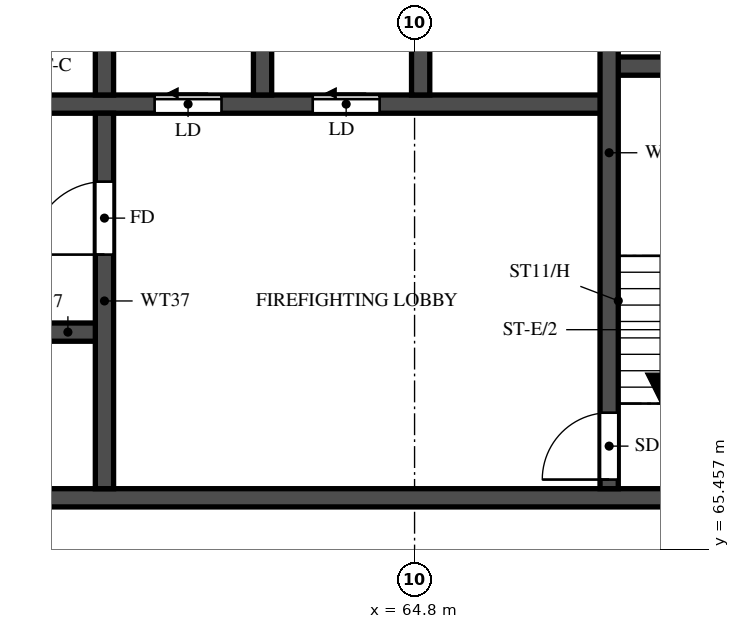
"""IFC4 building model, lengths in metres.
Left out: names, types, materials, properties, quantities, classifications, styles, units other than length and angle.
Written with IfcOpenShell. Run it as: python <this file> out.ifc"""

import sys

from ifc_helpers import new_model, si_unit, direction, frame, frame_2d, origin, place, context, subcontext, project, spatial, rectangle, extrude, element, fill, save


model = new_model("IFC4")
c1 = context("Model", 3, precision=1e-05, world=origin(), true_north=direction((0.0, 1.0)))
c2 = subcontext(c1, "Body", "Model", "MODEL_VIEW")
j1 = project(units=[si_unit("LENGTHUNIT", "METRE"), si_unit("PLANEANGLEUNIT", "RADIAN")], contexts=[c1])
p1 = place(None, origin())
s1 = spatial("IfcSite", under=j1, at=p1, CompositionType="ELEMENT")
p2 = place(p1, origin())
s2 = spatial("IfcBuilding", under=s1, at=p2, CompositionType="ELEMENT")
p3 = place(p2, frame((0.0, 0.0, 246.5)))
s3 = spatial("IfcBuildingStorey", under=s2, at=p3, CompositionType="ELEMENT", Elevation=246.5)
p4 = place(p3, frame((29.2, 66.3, 0.0), z_axis=(0.0, 0.0, 1.0), x_axis=(1.0, 0.0, 0.0)))
e1 = element("IfcWall", 1, at=p4, inside=s3, PredefinedType="SHEAR", context=c2, shape_type="SweptSolid", body=[
    extrude(rectangle(XDim=42.4, YDim=0.3, at=frame_2d((21.2, 0.0))), origin(), (0.0, 0.0, 1.0), 3.22),
])
p5 = place(p4, frame((1.425, 0.0, 0.0)))
e2 = element("IfcOpeningElement", 2, at=p5, cuts=e1, PredefinedType="OPENING", context=c2, shape_type="SweptSolid", body=[
    extrude(rectangle(XDim=1.1, YDim=2.1, at=frame_2d((0.55, 1.05))), frame((0.0, 0.16, 0.0), z_axis=(0.0, -1.0, 0.0), x_axis=(1.0, 0.0, 0.0)), (0.0, 0.0, 1.0), 0.32),
])
p6 = place(p4, frame((4.2, 0.0, 0.0)))
e3 = element("IfcOpeningElement", 3, at=p6, cuts=e1, PredefinedType="OPENING", context=c2, shape_type="SweptSolid", body=[
    extrude(rectangle(XDim=1.8, YDim=2.1, at=frame_2d((0.9, 1.05))), frame((0.0, 0.16, 0.0), z_axis=(0.0, -1.0, 0.0), x_axis=(1.0, 0.0, 0.0)), (0.0, 0.0, 1.0), 0.32),
])
p7 = place(p3, frame((35.65, 69.025, 0.0), z_axis=(0.0, 0.0, 1.0), x_axis=(1.0, 0.0, 0.0)))
e4 = element("IfcWall", 4, at=p7, inside=s3, PredefinedType="SHEAR", context=c2, shape_type="SweptSolid", body=[
    extrude(rectangle(XDim=24.05, YDim=0.3, at=frame_2d((12.025, 0.0))), origin(), (0.0, 0.0, 1.0), 3.22),
])
p8 = place(p7, frame((0.975, 0.0, 0.0)))
e5 = element("IfcOpeningElement", 5, at=p8, cuts=e4, PredefinedType="OPENING", context=c2, shape_type="SweptSolid", body=[
    extrude(rectangle(XDim=1.1, YDim=2.1, at=frame_2d((0.55, 1.05))), frame((0.0, 0.16, 0.0), z_axis=(0.0, -1.0, 0.0), x_axis=(1.0, 0.0, 0.0)), (0.0, 0.0, 1.0), 0.32),
])
p9 = place(p7, frame((3.725, 0.0, 0.0)))
e6 = element("IfcOpeningElement", 6, at=p9, cuts=e4, PredefinedType="OPENING", context=c2, shape_type="SweptSolid", body=[
    extrude(rectangle(XDim=1.1, YDim=2.1, at=frame_2d((0.55, 1.05))), frame((0.0, 0.16, 0.0), z_axis=(0.0, -1.0, 0.0), x_axis=(1.0, 0.0, 0.0)), (0.0, 0.0, 1.0), 0.32),
])
p10 = place(p7, frame((6.475, 0.0, 0.0)))
e7 = element("IfcOpeningElement", 7, at=p10, cuts=e4, PredefinedType="OPENING", context=c2, shape_type="SweptSolid", body=[
    extrude(rectangle(XDim=1.1, YDim=2.1, at=frame_2d((0.55, 1.05))), frame((0.0, 0.16, 0.0), z_axis=(0.0, -1.0, 0.0), x_axis=(1.0, 0.0, 0.0)), (0.0, 0.0, 1.0), 0.32),
])
p11 = place(p7, frame((9.225, 0.0, 0.0)))
e8 = element("IfcOpeningElement", 8, at=p11, cuts=e4, PredefinedType="OPENING", context=c2, shape_type="SweptSolid", body=[
    extrude(rectangle(XDim=1.1, YDim=2.1, at=frame_2d((0.55, 1.05))), frame((0.0, 0.16, 0.0), z_axis=(0.0, -1.0, 0.0), x_axis=(1.0, 0.0, 0.0)), (0.0, 0.0, 1.0), 0.32),
])
p12 = place(p7, frame((11.975, 0.0, 0.0)))
e9 = element("IfcOpeningElement", 9, at=p12, cuts=e4, PredefinedType="OPENING", context=c2, shape_type="SweptSolid", body=[
    extrude(rectangle(XDim=1.1, YDim=2.1, at=frame_2d((0.55, 1.05))), frame((0.0, 0.16, 0.0), z_axis=(0.0, -1.0, 0.0), x_axis=(1.0, 0.0, 0.0)), (0.0, 0.0, 1.0), 0.32),
])
p13 = place(p7, frame((14.725, 0.0, 0.0)))
e10 = element("IfcOpeningElement", 10, at=p13, cuts=e4, PredefinedType="OPENING", context=c2, shape_type="SweptSolid", body=[
    extrude(rectangle(XDim=1.1, YDim=2.1, at=frame_2d((0.55, 1.05))), frame((0.0, 0.16, 0.0), z_axis=(0.0, -1.0, 0.0), x_axis=(1.0, 0.0, 0.0)), (0.0, 0.0, 1.0), 0.32),
])
p14 = place(p7, frame((17.6, 0.0, 0.0)))
e11 = element("IfcOpeningElement", 11, at=p14, cuts=e4, PredefinedType="OPENING", context=c2, shape_type="SweptSolid", body=[
    extrude(rectangle(XDim=1.1, YDim=2.1, at=frame_2d((0.55, 1.05))), frame((0.0, 0.16, 0.0), z_axis=(0.0, -1.0, 0.0), x_axis=(1.0, 0.0, 0.0)), (0.0, 0.0, 1.0), 0.32),
])
p15 = place(p7, frame((20.6, 0.0, 0.0)))
e12 = element("IfcOpeningElement", 12, at=p15, cuts=e4, PredefinedType="OPENING", context=c2, shape_type="SweptSolid", body=[
    extrude(rectangle(XDim=1.1, YDim=2.1, at=frame_2d((0.55, 1.05))), frame((0.0, 0.16, 0.0), z_axis=(0.0, -1.0, 0.0), x_axis=(1.0, 0.0, 0.0)), (0.0, 0.0, 1.0), 0.32),
])
p16 = place(p3, frame((32.8, 72.775, 0.0), z_axis=(0.0, 0.0, 1.0), x_axis=(1.0, 0.0, 0.0)))
e13 = element("IfcWall", 13, at=p16, inside=s3, PredefinedType="SHEAR", context=c2, shape_type="SweptSolid", body=[
    extrude(rectangle(XDim=35.2, YDim=0.3, at=frame_2d((17.6, 0.0))), origin(), (0.0, 0.0, 1.0), 3.22),
])
p17 = place(p16, frame((19.8, 0.0, 0.0)))
e14 = element("IfcOpeningElement", 14, at=p17, cuts=e13, PredefinedType="OPENING", context=c2, shape_type="SweptSolid", body=[
    extrude(rectangle(XDim=1.1, YDim=2.1, at=frame_2d((0.55, 1.05))), frame((0.0, 0.16, 0.0), z_axis=(0.0, -1.0, 0.0), x_axis=(1.0, 0.0, 0.0)), (0.0, 0.0, 1.0), 0.32),
])
p18 = place(p16, frame((27.725, 0.0, 0.0)))
e15 = element("IfcOpeningElement", 15, at=p18, cuts=e13, PredefinedType="OPENING", context=c2, shape_type="SweptSolid", body=[
    extrude(rectangle(XDim=1.1, YDim=2.1, at=frame_2d((0.55, 1.05))), frame((0.0, 0.16, 0.0), z_axis=(0.0, -1.0, 0.0), x_axis=(1.0, 0.0, 0.0)), (0.0, 0.0, 1.0), 0.32),
])
p19 = place(p16, frame((30.325, 0.0, 0.0)))
e16 = element("IfcOpeningElement", 16, at=p19, cuts=e13, PredefinedType="OPENING", context=c2, shape_type="SweptSolid", body=[
    extrude(rectangle(XDim=1.1, YDim=2.1, at=frame_2d((0.55, 1.05))), frame((0.0, 0.16, 0.0), z_axis=(0.0, -1.0, 0.0), x_axis=(1.0, 0.0, 0.0)), (0.0, 0.0, 1.0), 0.32),
])
p20 = place(p16, frame((3.825, 0.0, 0.0)))
e17 = element("IfcOpeningElement", 17, at=p20, cuts=e13, PredefinedType="OPENING", context=c2, shape_type="SweptSolid", body=[
    extrude(rectangle(XDim=1.1, YDim=2.1, at=frame_2d((0.55, 1.05))), frame((0.0, 0.16, 0.0), z_axis=(0.0, -1.0, 0.0), x_axis=(1.0, 0.0, 0.0)), (0.0, 0.0, 1.0), 0.32),
])
p21 = place(p16, frame((6.575, 0.0, 0.0)))
e18 = element("IfcOpeningElement", 18, at=p21, cuts=e13, PredefinedType="OPENING", context=c2, shape_type="SweptSolid", body=[
    extrude(rectangle(XDim=1.1, YDim=2.1, at=frame_2d((0.55, 1.05))), frame((0.0, 0.16, 0.0), z_axis=(0.0, -1.0, 0.0), x_axis=(1.0, 0.0, 0.0)), (0.0, 0.0, 1.0), 0.32),
])
p22 = place(p16, frame((9.325, 0.0, 0.0)))
e19 = element("IfcOpeningElement", 19, at=p22, cuts=e13, PredefinedType="OPENING", context=c2, shape_type="SweptSolid", body=[
    extrude(rectangle(XDim=1.1, YDim=2.1, at=frame_2d((0.55, 1.05))), frame((0.0, 0.16, 0.0), z_axis=(0.0, -1.0, 0.0), x_axis=(1.0, 0.0, 0.0)), (0.0, 0.0, 1.0), 0.32),
])
p23 = place(p16, frame((12.075, 0.0, 0.0)))
e20 = element("IfcOpeningElement", 20, at=p23, cuts=e13, PredefinedType="OPENING", context=c2, shape_type="SweptSolid", body=[
    extrude(rectangle(XDim=1.1, YDim=2.1, at=frame_2d((0.55, 1.05))), frame((0.0, 0.16, 0.0), z_axis=(0.0, -1.0, 0.0), x_axis=(1.0, 0.0, 0.0)), (0.0, 0.0, 1.0), 0.32),
])
p24 = place(p16, frame((14.825, 0.0, 0.0)))
e21 = element("IfcOpeningElement", 21, at=p24, cuts=e13, PredefinedType="OPENING", context=c2, shape_type="SweptSolid", body=[
    extrude(rectangle(XDim=1.1, YDim=2.1, at=frame_2d((0.55, 1.05))), frame((0.0, 0.16, 0.0), z_axis=(0.0, -1.0, 0.0), x_axis=(1.0, 0.0, 0.0)), (0.0, 0.0, 1.0), 0.32),
])
p25 = place(p16, frame((17.575, 0.0, 0.0)))
e22 = element("IfcOpeningElement", 22, at=p25, cuts=e13, PredefinedType="OPENING", context=c2, shape_type="SweptSolid", body=[
    extrude(rectangle(XDim=1.1, YDim=2.1, at=frame_2d((0.55, 1.05))), frame((0.0, 0.16, 0.0), z_axis=(0.0, -1.0, 0.0), x_axis=(1.0, 0.0, 0.0)), (0.0, 0.0, 1.0), 0.32),
])
p26 = place(p16, frame((0.95, 0.0, 0.0)))
e23 = element("IfcOpeningElement", 23, at=p26, cuts=e13, PredefinedType="OPENING", context=c2, shape_type="SweptSolid", body=[
    extrude(rectangle(XDim=1.1, YDim=2.1, at=frame_2d((0.55, 1.05))), frame((0.0, 0.16, 0.0), z_axis=(0.0, -1.0, 0.0), x_axis=(1.0, 0.0, 0.0)), (0.0, 0.0, 1.0), 0.32),
])
p27 = place(p3, frame((68.0, 73.4, 0.0), z_axis=(0.0, 0.0, 1.0), x_axis=(1.0, 0.0, 0.0)))
e24 = element("IfcWall", 24, at=p27, inside=s3, PredefinedType="SHEAR", context=c2, shape_type="SweptSolid", body=[
    extrude(rectangle(XDim=3.1, YDim=0.3, at=frame_2d((1.55, 0.0))), origin(), (0.0, 0.0, 1.0), 3.22),
])
p28 = place(p3, frame((68.0, 66.45, 0.0), z_axis=(0.0, 0.0, 1.0), x_axis=(0.0, 1.0, 0.0)))
e25 = element("IfcWall", 25, at=p28, inside=s3, PredefinedType="SHEAR", context=c2, shape_type="SweptSolid", body=[
    extrude(rectangle(XDim=11.05, YDim=0.3, at=frame_2d((5.525, 0.0))), origin(), (0.0, 0.0, 1.0), 3.22),
])
p29 = place(p28, frame((0.15, 0.0, 0.0)))
e26 = element("IfcOpeningElement", 26, at=p29, cuts=e25, PredefinedType="OPENING", context=c2, shape_type="SweptSolid", body=[
    extrude(rectangle(XDim=1.1, YDim=2.1, at=frame_2d((0.55, 1.05))), frame((0.0, 0.16, 0.0), z_axis=(0.0, -1.0, 0.0), x_axis=(1.0, 0.0, 0.0)), (0.0, 0.0, 1.0), 0.32),
])
p30 = place(p3, frame((59.7, 66.45, 0.0), z_axis=(0.0, 0.0, 1.0), x_axis=(0.0, 1.0, 0.0)))
e27 = element("IfcWall", 27, at=p30, inside=s3, PredefinedType="SHEAR", context=c2, shape_type="SweptSolid", body=[
    extrude(rectangle(XDim=6.175, YDim=0.3, at=frame_2d((3.087, 0.0))), origin(), (0.0, 0.0, 1.0), 3.22),
])
p31 = place(p30, frame((3.85, 0.0, 0.0)))
e28 = element("IfcOpeningElement", 28, at=p31, cuts=e27, PredefinedType="OPENING", context=c2, shape_type="SweptSolid", body=[
    extrude(rectangle(XDim=1.2, YDim=2.1, at=frame_2d((0.6, 1.05))), frame((0.0, 0.16, 0.0), z_axis=(0.0, -1.0, 0.0), x_axis=(1.0, 0.0, 0.0)), (0.0, 0.0, 1.0), 0.32),
])
for number, where, z_axis, x_axis in (
    (29, (59.7, 72.925, 0.0), (0.0, 0.0, 1.0), (0.0, 1.0, 0.0)),
    (30, (62.3, 72.925, 0.0), (0.0, 0.0, 1.0), (0.0, 1.0, 0.0)),
    (31, (64.9, 72.925, 0.0), (0.0, 0.0, 1.0), (0.0, 1.0, 0.0)),
):
    element("IfcWall", number, at=place(p3, frame(where, z_axis=z_axis, x_axis=x_axis)), inside=s3, PredefinedType="SHEAR", context=c2, shape_type="SweptSolid", body=[
        extrude(rectangle(XDim=2.95, YDim=0.3, at=frame_2d((1.475, 0.0))), origin(), (0.0, 0.0, 1.0), 3.22),
    ])
p32 = place(p29, origin())
e32 = element("IfcDoor", 32, at=p32, inside=s3, OperationType="SINGLE_SWING_RIGHT", PredefinedType="DOOR", context=c2, shape_type="SweptSolid", body=[
    extrude(rectangle(XDim=1.1, YDim=2.1, at=frame_2d((0.55, 1.05))), frame((0.0, 0.025, 0.0), z_axis=(0.0, -1.0, 0.0), x_axis=(1.0, 0.0, 0.0)), (0.0, 0.0, 1.0), 0.05),
])
fill(e26, e32)
p33 = place(p31, origin())
e33 = element("IfcDoor", 33, at=p33, inside=s3, OperationType="SINGLE_SWING_LEFT", PredefinedType="DOOR", context=c2, shape_type="SweptSolid", body=[
    extrude(rectangle(XDim=1.2, YDim=2.1, at=frame_2d((0.6, 1.05))), frame((0.0, 0.025, 0.0), z_axis=(0.0, -1.0, 0.0), x_axis=(1.0, 0.0, 0.0)), (0.0, 0.0, 1.0), 0.05),
])
fill(e28, e33)
p34 = place(p18, origin())
e34 = element("IfcDoor", 34, at=p34, inside=s3, OperationType="SLIDING_TO_LEFT", PredefinedType="DOOR", context=c2, shape_type="SweptSolid", body=[
    extrude(rectangle(XDim=1.1, YDim=2.1, at=frame_2d((0.55, 1.05))), frame((0.0, 0.025, 0.0), z_axis=(0.0, -1.0, 0.0), x_axis=(1.0, 0.0, 0.0)), (0.0, 0.0, 1.0), 0.05),
])
fill(e15, e34)
p35 = place(p19, origin())
e35 = element("IfcDoor", 35, at=p35, inside=s3, OperationType="SLIDING_TO_LEFT", PredefinedType="DOOR", context=c2, shape_type="SweptSolid", body=[
    extrude(rectangle(XDim=1.1, YDim=2.1, at=frame_2d((0.55, 1.05))), frame((0.0, 0.025, 0.0), z_axis=(0.0, -1.0, 0.0), x_axis=(1.0, 0.0, 0.0)), (0.0, 0.0, 1.0), 0.05),
])
fill(e16, e35)
save(model, sys.argv[1])
